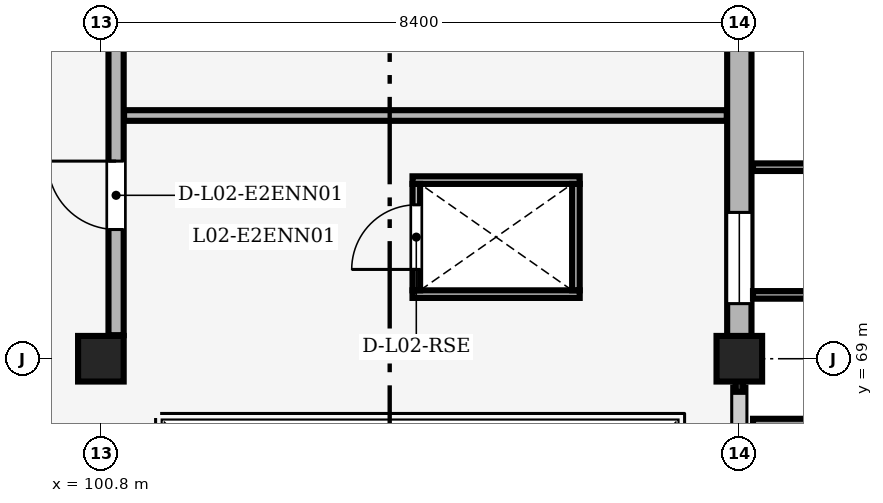
"""IFC4 building model, lengths in metres.
Left out: names, types, materials, properties, quantities, classifications, styles, units other than length and angle.
Written with IfcOpenShell. Run it as: python <this file> out.ifc"""

import sys

from ifc_helpers import new_model, si_unit, direction, frame, frame_2d, origin, origin_2d, place, context, subcontext, project, spatial, rectangle, extrude, element, fill, save


model = new_model("IFC4")
c1 = context("Model", 3, precision=1e-05, world=origin(), true_north=direction((0.0, 1.0)))
c2 = subcontext(c1, "Body", "Model", "MODEL_VIEW")
j1 = project(units=[si_unit("LENGTHUNIT", "METRE"), si_unit("PLANEANGLEUNIT", "RADIAN")], contexts=[c1])
p1 = place(None, origin())
s1 = spatial("IfcSite", under=j1, at=p1, CompositionType="ELEMENT")
p2 = place(p1, origin())
s2 = spatial("IfcBuilding", under=s1, at=p2, CompositionType="ELEMENT")
p3 = place(p2, frame((0.0, 0.0, 9.0)))
s3 = spatial("IfcBuildingStorey", under=s2, at=p3, CompositionType="ELEMENT", Elevation=9.0)
for number, where, z_axis, x_axis in (
    (1, (100.8, 69.0, 0.0), (0.0, 0.0, 1.0), (1.0, 0.0, 0.0)),
    (2, (109.2, 69.0, 0.0), (0.0, 0.0, 1.0), (1.0, 0.0, 0.0)),
):
    element("IfcColumn", number, at=place(p3, frame(where, z_axis=z_axis, x_axis=x_axis)), inside=s3, PredefinedType="COLUMN", context=c2, shape_type="SweptSolid", body=[
        extrude(rectangle(XDim=0.6, YDim=0.6, at=origin_2d()), origin(), (0.0, 0.0, 1.0), 4.2),
    ])
p4 = place(p3, frame((109.2, 69.275, 0.0), z_axis=(0.0, 0.0, 1.0), x_axis=(0.0, 1.0, 0.0)))
e3 = element("IfcWall", 3, at=p4, inside=s3, PredefinedType="SOLIDWALL", context=c2, shape_type="SweptSolid", body=[
    extrude(rectangle(XDim=7.85, YDim=0.32, at=frame_2d((3.925, 0.0))), origin(), (0.0, 0.0, 1.0), 3.29),
])
p5 = place(p4, frame((0.45, 0.0, 0.85)))
e4 = element("IfcOpeningElement", 4, at=p5, cuts=e3, PredefinedType="OPENING", context=c2, shape_type="SweptSolid", body=[
    extrude(rectangle(XDim=1.2, YDim=1.8, at=frame_2d((0.6, 0.9))), frame((0.0, 0.17, 0.0), z_axis=(0.0, -1.0, 0.0), x_axis=(1.0, 0.0, 0.0)), (0.0, 0.0, 1.0), 0.34),
])
p6 = place(p4, frame((6.2, 0.0, 0.85)))
e5 = element("IfcOpeningElement", 5, at=p6, cuts=e3, PredefinedType="OPENING", context=c2, shape_type="SweptSolid", body=[
    extrude(rectangle(XDim=1.2, YDim=1.8, at=frame_2d((0.6, 0.9))), frame((0.0, 0.17, 0.0), z_axis=(0.0, -1.0, 0.0), x_axis=(1.0, 0.0, 0.0)), (0.0, 0.0, 1.0), 0.34),
])
for number, where, z_axis, x_axis in (
    (6, (104.9, 69.85, 0.0), (0.0, 0.0, 1.0), (1.0, 0.0, 0.0)),
    (7, (104.9, 71.35, 0.0), (0.0, 0.0, 1.0), (1.0, 0.0, 0.0)),
):
    element("IfcWall", number, at=place(p3, frame(where, z_axis=z_axis, x_axis=x_axis)), inside=s3, PredefinedType="PARTITIONING", context=c2, shape_type="SweptSolid", body=[
        extrude(rectangle(XDim=2.2, YDim=0.1, at=frame_2d((1.1, 0.0))), origin(), (0.0, 0.0, 1.0), 3.9),
    ])
p7 = place(p3, frame((104.95, 69.9, 0.0), z_axis=(0.0, 0.0, 1.0), x_axis=(0.0, 1.0, 0.0)))
e8 = element("IfcWall", 8, at=p7, inside=s3, PredefinedType="PARTITIONING", context=c2, shape_type="SweptSolid", body=[
    extrude(rectangle(XDim=1.4, YDim=0.1, at=frame_2d((0.7, 0.0))), origin(), (0.0, 0.0, 1.0), 3.9),
])
p8 = place(p7, frame((0.275, 0.0, 0.0)))
e9 = element("IfcOpeningElement", 9, at=p8, cuts=e8, PredefinedType="OPENING", context=c2, shape_type="SweptSolid", body=[
    extrude(rectangle(XDim=0.85, YDim=2.05, at=frame_2d((0.425, 1.025))), frame((0.0, 0.06, 0.0), z_axis=(0.0, -1.0, 0.0), x_axis=(1.0, 0.0, 0.0)), (0.0, 0.0, 1.0), 0.12),
])
p9 = place(p3, frame((107.05, 69.9, 0.0), z_axis=(0.0, 0.0, 1.0), x_axis=(0.0, 1.0, 0.0)))
e10 = element("IfcWall", 10, at=p9, inside=s3, PredefinedType="PARTITIONING", context=c2, shape_type="SweptSolid", body=[
    extrude(rectangle(XDim=1.4, YDim=0.1, at=frame_2d((0.7, 0.0))), origin(), (0.0, 0.0, 1.0), 3.9),
])
p10 = place(p3, frame((101.105, 72.2, 0.0), z_axis=(0.0, 0.0, 1.0), x_axis=(1.0, 0.0, 0.0)))
e11 = element("IfcWall", 11, at=p10, inside=s3, PredefinedType="PARTITIONING", context=c2, shape_type="SweptSolid", body=[
    extrude(rectangle(XDim=7.93, YDim=0.14, at=frame_2d((3.965, 0.0))), origin(), (0.0, 0.0, 1.0), 3.9),
])
p11 = place(p3, frame((101.0, 69.31, 0.0), z_axis=(0.0, 0.0, 1.0), x_axis=(0.0, 1.0, 0.0)))
e12 = element("IfcWall", 12, at=p11, inside=s3, PredefinedType="PARTITIONING", context=c2, shape_type="SweptSolid", body=[
    extrude(rectangle(XDim=7.78, YDim=0.2, at=frame_2d((3.89, 0.0))), origin(), (0.0, 0.0, 1.0), 3.09),
])
p12 = place(p11, frame((1.39, 0.0, 0.0)))
e13 = element("IfcOpeningElement", 13, at=p12, cuts=e12, PredefinedType="OPENING", context=c2, shape_type="SweptSolid", body=[
    extrude(rectangle(XDim=0.9, YDim=2.1, at=frame_2d((0.45, 1.05))), frame((0.0, 0.11, 0.0), z_axis=(0.0, -1.0, 0.0), x_axis=(1.0, 0.0, 0.0)), (0.0, 0.0, 1.0), 0.22),
])
p13 = place(p11, frame((4.99, 0.0, 0.0)))
e14 = element("IfcOpeningElement", 14, at=p13, cuts=e12, PredefinedType="OPENING", context=c2, shape_type="SweptSolid", body=[
    extrude(rectangle(XDim=1.0, YDim=2.15, at=frame_2d((0.5, 1.075))), frame((0.0, 0.11, 0.0), z_axis=(0.0, -1.0, 0.0), x_axis=(1.0, 0.0, 0.0)), (0.0, 0.0, 1.0), 0.22),
])
p14 = place(p5, origin())
e15 = element("IfcWindow", 15, at=p14, inside=s3, PartitioningType="SINGLE_PANEL", PredefinedType="WINDOW", context=c2, shape_type="SweptSolid", body=[
    extrude(rectangle(XDim=1.2, YDim=1.8, at=frame_2d((0.6, 0.9))), frame((0.0, 0.03, 0.0), z_axis=(0.0, -1.0, 0.0), x_axis=(1.0, 0.0, 0.0)), (0.0, 0.0, 1.0), 0.06),
])
fill(e4, e15)
p15 = place(p8, origin())
e16 = element("IfcDoor", 16, at=p15, inside=s3, OperationType="SINGLE_SWING_LEFT", PredefinedType="DOOR", context=c2, shape_type="SweptSolid", body=[
    extrude(rectangle(XDim=0.85, YDim=2.05, at=frame_2d((0.425, 1.025))), frame((0.0, 0.025, 0.0), z_axis=(0.0, -1.0, 0.0), x_axis=(1.0, 0.0, 0.0)), (0.0, 0.0, 1.0), 0.05),
])
fill(e9, e16)
p16 = place(p12, origin())
e17 = element("IfcDoor", 17, at=p16, inside=s3, OperationType="SINGLE_SWING_RIGHT", PredefinedType="DOOR", context=c2, shape_type="SweptSolid", body=[
    extrude(rectangle(XDim=0.9, YDim=2.1, at=frame_2d((0.45, 1.05))), frame((0.0, 0.025, 0.0), z_axis=(0.0, -1.0, 0.0), x_axis=(1.0, 0.0, 0.0)), (0.0, 0.0, 1.0), 0.05),
])
fill(e13, e17)
save(model, sys.argv[1])
